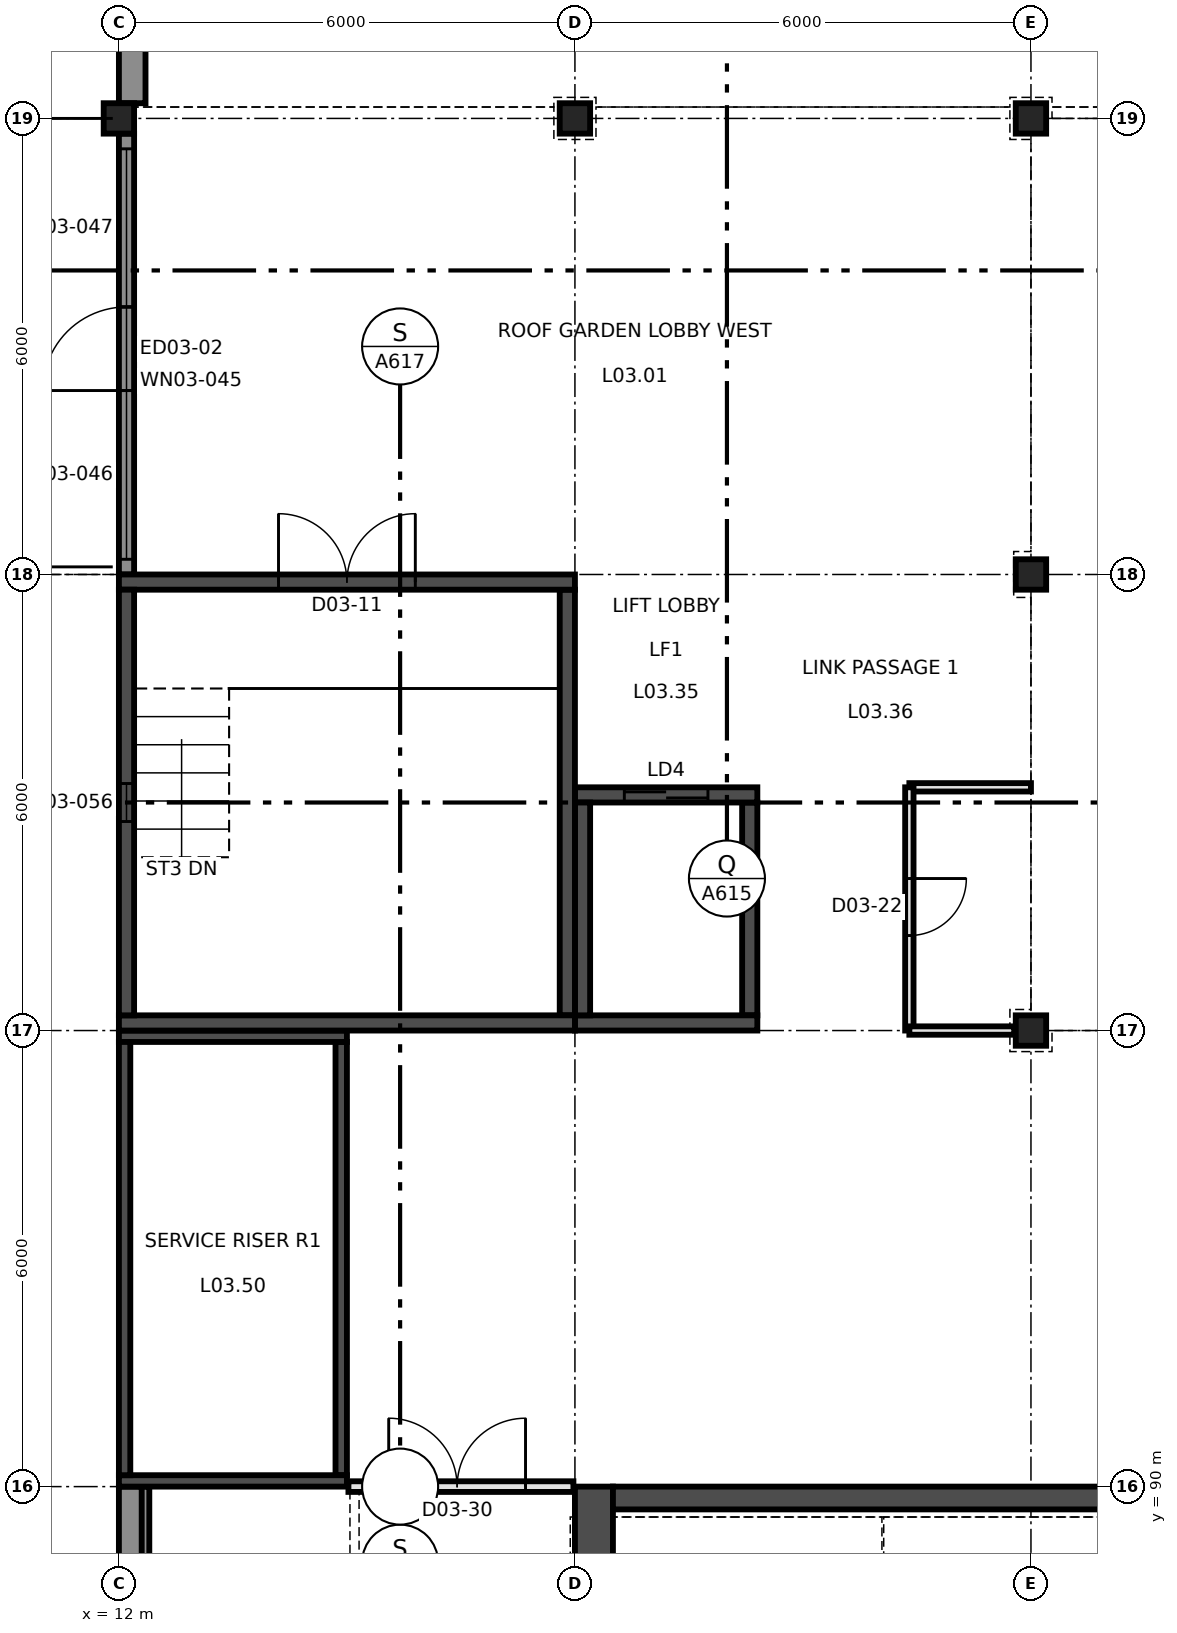
"""IFC4 building model, lengths in metres.
Left out: names, types, materials, properties, quantities, classifications, styles, units other than length and angle.
Written with IfcOpenShell. Run it as: python <this file> out.ifc"""

import sys

from ifc_helpers import new_model, si_unit, direction, frame, frame_2d, origin, origin_2d, place, context, subcontext, project, spatial, rectangle, extrude, element, fill, save


model = new_model("IFC4")
c1 = context("Model", 3, precision=1e-05, world=origin(), true_north=direction((0.0, 1.0)))
c2 = subcontext(c1, "Body", "Model", "MODEL_VIEW")
j1 = project(units=[si_unit("LENGTHUNIT", "METRE"), si_unit("PLANEANGLEUNIT", "RADIAN")], contexts=[c1])
p1 = place(None, origin())
s1 = spatial("IfcSite", under=j1, at=p1, CompositionType="ELEMENT")
p2 = place(p1, origin())
s2 = spatial("IfcBuilding", under=s1, at=p2, CompositionType="ELEMENT")
p3 = place(p2, frame((0.0, 0.0, 16.5)))
s3 = spatial("IfcBuildingStorey", under=s2, at=p3, CompositionType="ELEMENT", Elevation=16.5)
for number, where, z_axis, x_axis in (
    (1, (24.0, 96.0, 0.0), (0.0, 0.0, 1.0), (1.0, 0.0, 0.0)),
    (2, (24.0, 102.0, 0.0), (0.0, 0.0, 1.0), (1.0, 0.0, 0.0)),
    (3, (12.0, 108.0, 0.0), (0.0, 0.0, 1.0), (1.0, 0.0, 0.0)),
    (4, (18.0, 108.0, 0.0), (0.0, 0.0, 1.0), (1.0, 0.0, 0.0)),
    (5, (24.0, 108.0, 0.0), (0.0, 0.0, 1.0), (1.0, 0.0, 0.0)),
):
    element("IfcColumn", number, at=place(p3, frame(where, z_axis=z_axis, x_axis=x_axis)), inside=s3, PredefinedType="COLUMN", context=c2, shape_type="SweptSolid", body=[
        extrude(rectangle(XDim=0.4, YDim=0.4, at=origin_2d()), origin(), (0.0, 0.0, 1.0), 11.5),
    ])
p4 = place(p3, frame((12.0, 101.9, 0.0), z_axis=(0.0, 0.0, 1.0), x_axis=(1.0, 0.0, 0.0)))
e6 = element("IfcWall", 6, at=p4, inside=s3, PredefinedType="SHEAR", context=c2, shape_type="SweptSolid", body=[
    extrude(rectangle(XDim=6.0, YDim=0.2, at=frame_2d((3.0, 0.0))), origin(), (0.0, 0.0, 1.0), 11.5),
])
p5 = place(p4, frame((2.1, 0.0, 0.0)))
e7 = element("IfcOpeningElement", 7, at=p5, cuts=e6, PredefinedType="OPENING", context=c2, shape_type="SweptSolid", body=[
    extrude(rectangle(XDim=1.8, YDim=2.2, at=frame_2d((0.9, 1.1))), frame((0.0, 0.11, 0.0), z_axis=(0.0, -1.0, 0.0), x_axis=(1.0, 0.0, 0.0)), (0.0, 0.0, 1.0), 0.22),
])
p6 = place(p3, frame((12.0, 96.1, 0.0), z_axis=(0.0, 0.0, 1.0), x_axis=(1.0, 0.0, 0.0)))
e8 = element("IfcWall", 8, at=p6, inside=s3, PredefinedType="SHEAR", context=c2, shape_type="SweptSolid", body=[
    extrude(rectangle(XDim=6.0, YDim=0.2, at=frame_2d((3.0, 0.0))), origin(), (0.0, 0.0, 1.0), 11.5),
])
p7 = place(p3, frame((12.1, 96.2, 0.0), z_axis=(0.0, 0.0, 1.0), x_axis=(0.0, 1.0, 0.0)))
e9 = element("IfcWall", 9, at=p7, inside=s3, PredefinedType="SHEAR", context=c2, shape_type="SweptSolid", body=[
    extrude(rectangle(XDim=5.6, YDim=0.2, at=frame_2d((2.8, 0.0))), origin(), (0.0, 0.0, 1.0), 11.5),
])
p8 = place(p7, frame((2.55, 0.0, 0.9)))
e10 = element("IfcOpeningElement", 10, at=p8, cuts=e9, PredefinedType="OPENING", context=c2, shape_type="SweptSolid", body=[
    extrude(rectangle(XDim=0.5, YDim=2.1, at=frame_2d((0.25, 1.05))), frame((0.0, 0.11, 0.0), z_axis=(0.0, -1.0, 0.0), x_axis=(1.0, 0.0, 0.0)), (0.0, 0.0, 1.0), 0.22),
])
p9 = place(p3, frame((17.9, 96.2, 0.0), z_axis=(0.0, 0.0, 1.0), x_axis=(0.0, 1.0, 0.0)))
e11 = element("IfcWall", 11, at=p9, inside=s3, PredefinedType="SHEAR", context=c2, shape_type="SweptSolid", body=[
    extrude(rectangle(XDim=5.6, YDim=0.2, at=frame_2d((2.8, 0.0))), origin(), (0.0, 0.0, 1.0), 11.5),
])
p10 = place(p3, frame((18.0, 99.1, 0.0), z_axis=(0.0, 0.0, 1.0), x_axis=(1.0, 0.0, 0.0)))
e12 = element("IfcWall", 12, at=p10, inside=s3, PredefinedType="SHEAR", context=c2, shape_type="SweptSolid", body=[
    extrude(rectangle(XDim=2.4, YDim=0.2, at=frame_2d((1.2, 0.0))), origin(), (0.0, 0.0, 1.0), 11.5),
])
p11 = place(p10, frame((0.65, 0.0, 0.0)))
e13 = element("IfcOpeningElement", 13, at=p11, cuts=e12, PredefinedType="OPENING", context=c2, shape_type="SweptSolid", body=[
    extrude(rectangle(XDim=1.1, YDim=2.1, at=frame_2d((0.55, 1.05))), frame((0.0, 0.11, 0.0), z_axis=(0.0, -1.0, 0.0), x_axis=(1.0, 0.0, 0.0)), (0.0, 0.0, 1.0), 0.22),
])
p12 = place(p3, frame((18.0, 96.1, 0.0), z_axis=(0.0, 0.0, 1.0), x_axis=(1.0, 0.0, 0.0)))
e14 = element("IfcWall", 14, at=p12, inside=s3, PredefinedType="SHEAR", context=c2, shape_type="SweptSolid", body=[
    extrude(rectangle(XDim=2.4, YDim=0.2, at=frame_2d((1.2, 0.0))), origin(), (0.0, 0.0, 1.0), 11.5),
])
for number, where, z_axis, x_axis in (
    (15, (18.1, 96.2, 0.0), (0.0, 0.0, 1.0), (0.0, 1.0, 0.0)),
    (16, (20.3, 96.2, 0.0), (0.0, 0.0, 1.0), (0.0, 1.0, 0.0)),
):
    element("IfcWall", number, at=place(p3, frame(where, z_axis=z_axis, x_axis=x_axis)), inside=s3, PredefinedType="SHEAR", context=c2, shape_type="SweptSolid", body=[
        extrude(rectangle(XDim=2.8, YDim=0.2, at=frame_2d((1.4, 0.0))), origin(), (0.0, 0.0, 1.0), 11.5),
    ])
for number, where, z_axis, x_axis in (
    (17, (12.0, 95.925, 0.0), (0.0, 0.0, 1.0), (1.0, 0.0, 0.0)),
    (18, (12.0, 90.075, 0.0), (0.0, 0.0, 1.0), (1.0, 0.0, 0.0)),
):
    element("IfcWall", number, at=place(p3, frame(where, z_axis=z_axis, x_axis=x_axis)), inside=s3, PredefinedType="SHEAR", context=c2, shape_type="SweptSolid", body=[
        extrude(rectangle(XDim=3.0, YDim=0.15, at=frame_2d((1.5, 0.0))), origin(), (0.0, 0.0, 1.0), 11.5),
    ])
for number, where, z_axis, x_axis in (
    (19, (12.075, 90.15, 0.0), (0.0, 0.0, 1.0), (0.0, 1.0, 0.0)),
    (20, (14.925, 90.15, 0.0), (0.0, 0.0, 1.0), (0.0, 1.0, 0.0)),
):
    element("IfcWall", number, at=place(p3, frame(where, z_axis=z_axis, x_axis=x_axis)), inside=s3, PredefinedType="SHEAR", context=c2, shape_type="SweptSolid", body=[
        extrude(rectangle(XDim=5.7, YDim=0.15, at=frame_2d((2.85, 0.0))), origin(), (0.0, 0.0, 1.0), 11.5),
    ])
p13 = place(p3, frame((18.25, 54.5, 0.0), z_axis=(0.0, 0.0, 1.0), x_axis=(0.0, 1.0, 0.0)))
e21 = element("IfcWall", 21, at=p13, inside=s3, PredefinedType="SHEAR", context=c2, shape_type="SweptSolid", body=[
    extrude(rectangle(XDim=35.5, YDim=0.5, at=frame_2d((17.75, 0.0))), origin(), (0.0, 0.0, 1.0), 3.9),
])
p14 = place(p13, frame((29.35, 0.0, 0.0)))
e22 = element("IfcOpeningElement", 22, at=p14, cuts=e21, PredefinedType="OPENING", context=c2, shape_type="SweptSolid", body=[
    extrude(rectangle(XDim=1.3, YDim=2.1, at=frame_2d((0.65, 1.05))), frame((0.0, 0.26, 0.0), z_axis=(0.0, -1.0, 0.0), x_axis=(1.0, 0.0, 0.0)), (0.0, 0.0, 1.0), 0.52),
])
p15 = place(p13, frame((2.6, 0.0, 0.0)))
e23 = element("IfcOpeningElement", 23, at=p15, cuts=e21, PredefinedType="OPENING", context=c2, shape_type="SweptSolid", body=[
    extrude(rectangle(XDim=1.0, YDim=2.1, at=frame_2d((0.5, 1.05))), frame((0.0, 0.26, 0.0), z_axis=(0.0, -1.0, 0.0), x_axis=(1.0, 0.0, 0.0)), (0.0, 0.0, 1.0), 0.52),
])
p16 = place(p3, frame((18.5, 89.85, 0.0), z_axis=(0.0, 0.0, 1.0), x_axis=(1.0, 0.0, 0.0)))
e24 = element("IfcWall", 24, at=p16, inside=s3, PredefinedType="SHEAR", context=c2, shape_type="SweptSolid", body=[
    extrude(rectangle(XDim=29.0, YDim=0.3, at=frame_2d((14.5, 0.0))), origin(), (0.0, 0.0, 1.0), 11.5),
])
p17 = place(p3, frame((12.225, 84.0, 0.0), z_axis=(0.0, 0.0, 1.0), x_axis=(0.0, 1.0, 0.0)))
e25 = element("IfcWall", 25, at=p17, inside=s3, PredefinedType="SOLIDWALL", context=c2, shape_type="SweptSolid", body=[
    extrude(rectangle(XDim=6.0, YDim=0.35, at=frame_2d((3.0, 0.0))), origin(), (0.0, 0.0, 1.0), 3.9),
])
p18 = place(p3, frame((12.1, 102.0, 0.0), z_axis=(0.0, 0.0, 1.0), x_axis=(0.0, 1.0, 0.0)))
e26 = element("IfcWall", 26, at=p18, inside=s3, PredefinedType="SOLIDWALL", context=c2, shape_type="SweptSolid", body=[
    extrude(rectangle(XDim=5.8, YDim=0.2, at=frame_2d((2.9, 0.0))), origin(), (0.0, 0.0, 1.0), 10.9),
])
p19 = place(p18, frame((2.42, 0.0, 0.0)))
e27 = element("IfcOpeningElement", 27, at=p19, cuts=e26, PredefinedType="OPENING", context=c2, shape_type="SweptSolid", body=[
    extrude(rectangle(XDim=1.1, YDim=2.4, at=frame_2d((0.55, 1.2))), frame((0.0, 0.11, 0.0), z_axis=(0.0, -1.0, 0.0), x_axis=(1.0, 0.0, 0.0)), (0.0, 0.0, 1.0), 0.22),
])
p20 = place(p18, frame((2.42, 0.0, 2.5)))
e28 = element("IfcOpeningElement", 28, at=p20, cuts=e26, PredefinedType="OPENING", context=c2, shape_type="SweptSolid", body=[
    extrude(rectangle(XDim=1.1, YDim=2.9, at=frame_2d((0.55, 1.45))), frame((0.0, 0.11, 0.0), z_axis=(0.0, -1.0, 0.0), x_axis=(1.0, 0.0, 0.0)), (0.0, 0.0, 1.0), 0.22),
])
p21 = place(p18, frame((0.2, 0.0, 0.1)))
e29 = element("IfcOpeningElement", 29, at=p21, cuts=e26, PredefinedType="OPENING", context=c2, shape_type="SweptSolid", body=[
    extrude(rectangle(XDim=2.22, YDim=5.3, at=frame_2d((1.11, 2.65))), frame((0.0, 0.11, 0.0), z_axis=(0.0, -1.0, 0.0), x_axis=(1.0, 0.0, 0.0)), (0.0, 0.0, 1.0), 0.22),
])
p22 = place(p18, frame((3.52, 0.0, 0.1)))
e30 = element("IfcOpeningElement", 30, at=p22, cuts=e26, PredefinedType="OPENING", context=c2, shape_type="SweptSolid", body=[
    extrude(rectangle(XDim=2.08, YDim=5.3, at=frame_2d((1.04, 2.65))), frame((0.0, 0.11, 0.0), z_axis=(0.0, -1.0, 0.0), x_axis=(1.0, 0.0, 0.0)), (0.0, 0.0, 1.0), 0.22),
])
p23 = place(p3, frame((12.175, 108.2, 0.0), z_axis=(0.0, 0.0, 1.0), x_axis=(0.0, 1.0, 0.0)))
e31 = element("IfcWall", 31, at=p23, inside=s3, PredefinedType="SOLIDWALL", context=c2, shape_type="SweptSolid", body=[
    extrude(rectangle(XDim=5.6, YDim=0.35, at=frame_2d((2.8, 0.0))), origin(), (0.0, 0.0, 1.0), 10.9),
])
p24 = place(p23, frame((1.25, 0.0, 1.0)))
e32 = element("IfcOpeningElement", 32, at=p24, cuts=e31, PredefinedType="OPENING", context=c2, shape_type="SweptSolid", body=[
    extrude(rectangle(XDim=1.1, YDim=4.4, at=frame_2d((0.55, 2.2))), frame((0.0, 0.185, 0.0), z_axis=(0.0, -1.0, 0.0), x_axis=(1.0, 0.0, 0.0)), (0.0, 0.0, 1.0), 0.37),
])
p25 = place(p23, frame((3.25, 0.0, 1.0)))
e33 = element("IfcOpeningElement", 33, at=p25, cuts=e31, PredefinedType="OPENING", context=c2, shape_type="SweptSolid", body=[
    extrude(rectangle(XDim=1.1, YDim=4.4, at=frame_2d((0.55, 2.2))), frame((0.0, 0.185, 0.0), z_axis=(0.0, -1.0, 0.0), x_axis=(1.0, 0.0, 0.0)), (0.0, 0.0, 1.0), 0.37),
])
p26 = place(p23, frame((1.25, 0.0, 6.6)))
e34 = element("IfcOpeningElement", 34, at=p26, cuts=e31, PredefinedType="OPENING", context=c2, shape_type="SweptSolid", body=[
    extrude(rectangle(XDim=1.1, YDim=2.1, at=frame_2d((0.55, 1.05))), frame((0.0, 0.185, 0.0), z_axis=(0.0, -1.0, 0.0), x_axis=(1.0, 0.0, 0.0)), (0.0, 0.0, 1.0), 0.37),
])
p27 = place(p23, frame((3.25, 0.0, 6.6)))
e35 = element("IfcOpeningElement", 35, at=p27, cuts=e31, PredefinedType="OPENING", context=c2, shape_type="SweptSolid", body=[
    extrude(rectangle(XDim=1.1, YDim=2.1, at=frame_2d((0.55, 1.05))), frame((0.0, 0.185, 0.0), z_axis=(0.0, -1.0, 0.0), x_axis=(1.0, 0.0, 0.0)), (0.0, 0.0, 1.0), 0.37),
])
p28 = place(p3, frame((12.15, 30.0, 4.5), z_axis=(0.0, 0.0, 1.0), x_axis=(0.0, 1.0, 0.0)))
e36 = element("IfcWall", 36, at=p28, inside=s3, PredefinedType="PARAPET", context=c2, shape_type="SweptSolid", body=[
    extrude(rectangle(XDim=60.0, YDim=0.3, at=frame_2d((30.0, 0.0))), origin(), (0.0, 0.0, 1.0), 1.2),
])
p29 = place(p3, frame((22.4, 99.2, 0.0), z_axis=(0.0, 0.0, 1.0), x_axis=(1.0, 0.0, 0.0)))
e37 = element("IfcWall", 37, at=p29, inside=s3, PredefinedType="PARTITIONING", context=c2, shape_type="SweptSolid", body=[
    extrude(rectangle(XDim=1.6, YDim=0.11, at=frame_2d((0.8, 0.0))), origin(), (0.0, 0.0, 1.0), 6.28),
])
p30 = place(p3, frame((22.4, 96.0, 0.0), z_axis=(0.0, 0.0, 1.0), x_axis=(0.0, 1.0, 0.0)))
e38 = element("IfcWall", 38, at=p30, inside=s3, PredefinedType="PARTITIONING", context=c2, shape_type="SweptSolid", body=[
    extrude(rectangle(XDim=3.2, YDim=0.11, at=frame_2d((1.6, 0.0))), origin(), (0.0, 0.0, 1.0), 6.28),
])
p31 = place(p30, frame((1.25, 0.0, 0.0)))
e39 = element("IfcOpeningElement", 39, at=p31, cuts=e38, PredefinedType="OPENING", context=c2, shape_type="SweptSolid", body=[
    extrude(rectangle(XDim=0.75, YDim=2.04, at=frame_2d((0.375, 1.02))), frame((0.0, 0.065, 0.0), z_axis=(0.0, -1.0, 0.0), x_axis=(1.0, 0.0, 0.0)), (0.0, 0.0, 1.0), 0.13),
])
p32 = place(p3, frame((22.4, 96.0, 0.0), z_axis=(0.0, 0.0, 1.0), x_axis=(1.0, 0.0, 0.0)))
e40 = element("IfcWall", 40, at=p32, inside=s3, PredefinedType="PARTITIONING", context=c2, shape_type="SweptSolid", body=[
    extrude(rectangle(XDim=1.38, YDim=0.11, at=frame_2d((0.69, 0.0))), origin(), (0.0, 0.0, 1.0), 6.28),
])
p33 = place(p3, frame((15.02, 90.0, 0.0), z_axis=(0.0, 0.0, 1.0), x_axis=(1.0, 0.0, 0.0)))
e41 = element("IfcWall", 41, at=p33, inside=s3, PredefinedType="PARTITIONING", context=c2, shape_type="SweptSolid", body=[
    extrude(rectangle(XDim=2.96, YDim=0.14, at=frame_2d((1.48, 0.0))), origin(), (0.0, 0.0, 1.0), 3.9),
])
p34 = place(p33, frame((0.53, 0.0, 0.0)))
e42 = element("IfcOpeningElement", 42, at=p34, cuts=e41, PredefinedType="OPENING", context=c2, shape_type="SweptSolid", body=[
    extrude(rectangle(XDim=1.8, YDim=2.1, at=frame_2d((0.9, 1.05))), frame((0.0, 0.08, 0.0), z_axis=(0.0, -1.0, 0.0), x_axis=(1.0, 0.0, 0.0)), (0.0, 0.0, 1.0), 0.16),
])
p35 = place(p19, origin())
e43 = element("IfcDoor", 43, at=p35, inside=s3, OperationType="SINGLE_SWING_LEFT", PredefinedType="DOOR", context=c2, shape_type="SweptSolid", body=[
    extrude(rectangle(XDim=1.1, YDim=2.4, at=frame_2d((0.55, 1.2))), frame((0.0, 0.025, 0.0), z_axis=(0.0, -1.0, 0.0), x_axis=(1.0, 0.0, 0.0)), (0.0, 0.0, 1.0), 0.05),
])
fill(e27, e43)
p36 = place(p20, origin())
e44 = element("IfcWindow", 44, at=p36, inside=s3, PartitioningType="SINGLE_PANEL", PredefinedType="WINDOW", context=c2, shape_type="SweptSolid", body=[
    extrude(rectangle(XDim=1.1, YDim=2.9, at=frame_2d((0.55, 1.45))), frame((0.0, 0.03, 0.0), z_axis=(0.0, -1.0, 0.0), x_axis=(1.0, 0.0, 0.0)), (0.0, 0.0, 1.0), 0.06),
])
fill(e28, e44)
p37 = place(p21, origin())
e45 = element("IfcWindow", 45, at=p37, inside=s3, PartitioningType="SINGLE_PANEL", PredefinedType="WINDOW", context=c2, shape_type="SweptSolid", body=[
    extrude(rectangle(XDim=2.22, YDim=5.3, at=frame_2d((1.11, 2.65))), frame((0.0, 0.03, 0.0), z_axis=(0.0, -1.0, 0.0), x_axis=(1.0, 0.0, 0.0)), (0.0, 0.0, 1.0), 0.06),
])
fill(e29, e45)
p38 = place(p22, origin())
e46 = element("IfcWindow", 46, at=p38, inside=s3, PartitioningType="SINGLE_PANEL", PredefinedType="WINDOW", context=c2, shape_type="SweptSolid", body=[
    extrude(rectangle(XDim=2.08, YDim=5.3, at=frame_2d((1.04, 2.65))), frame((0.0, 0.03, 0.0), z_axis=(0.0, -1.0, 0.0), x_axis=(1.0, 0.0, 0.0)), (0.0, 0.0, 1.0), 0.06),
])
fill(e30, e46)
p39 = place(p8, origin())
e47 = element("IfcWindow", 47, at=p39, inside=s3, PartitioningType="SINGLE_PANEL", PredefinedType="WINDOW", context=c2, shape_type="SweptSolid", body=[
    extrude(rectangle(XDim=0.5, YDim=2.1, at=frame_2d((0.25, 1.05))), frame((0.0, 0.03, 0.0), z_axis=(0.0, -1.0, 0.0), x_axis=(1.0, 0.0, 0.0)), (0.0, 0.0, 1.0), 0.06),
])
fill(e10, e47)
p40 = place(p5, frame((1.8, 0.0, 0.0), z_axis=(0.0, 0.0, 1.0), x_axis=(-1.0, 0.0, 0.0)))
e48 = element("IfcDoor", 48, at=p40, inside=s3, OperationType="DOUBLE_DOOR_SINGLE_SWING", PredefinedType="DOOR", context=c2, shape_type="SweptSolid", body=[
    extrude(rectangle(XDim=1.8, YDim=2.2, at=frame_2d((0.9, 1.1))), frame((0.0, 0.025, 0.0), z_axis=(0.0, -1.0, 0.0), x_axis=(1.0, 0.0, 0.0)), (0.0, 0.0, 1.0), 0.05),
])
fill(e7, e48)
p41 = place(p31, frame((0.75, 0.0, 0.0), z_axis=(0.0, 0.0, 1.0), x_axis=(-1.0, 0.0, 0.0)))
e49 = element("IfcDoor", 49, at=p41, inside=s3, OperationType="SINGLE_SWING_RIGHT", PredefinedType="DOOR", context=c2, shape_type="SweptSolid", body=[
    extrude(rectangle(XDim=0.75, YDim=2.04, at=frame_2d((0.375, 1.02))), frame((0.0, 0.025, 0.0), z_axis=(0.0, -1.0, 0.0), x_axis=(1.0, 0.0, 0.0)), (0.0, 0.0, 1.0), 0.05),
])
fill(e39, e49)
p42 = place(p34, frame((1.8, 0.0, 0.0), z_axis=(0.0, 0.0, 1.0), x_axis=(-1.0, 0.0, 0.0)))
e50 = element("IfcDoor", 50, at=p42, inside=s3, OperationType="DOUBLE_DOOR_SINGLE_SWING", PredefinedType="DOOR", context=c2, shape_type="SweptSolid", body=[
    extrude(rectangle(XDim=1.8, YDim=2.1, at=frame_2d((0.9, 1.05))), frame((0.0, 0.025, 0.0), z_axis=(0.0, -1.0, 0.0), x_axis=(1.0, 0.0, 0.0)), (0.0, 0.0, 1.0), 0.05),
])
fill(e42, e50)
p43 = place(p11, origin())
e51 = element("IfcDoor", 51, at=p43, inside=s3, OperationType="DOUBLE_DOOR_SLIDING", PredefinedType="DOOR", context=c2, shape_type="SweptSolid", body=[
    extrude(rectangle(XDim=1.1, YDim=2.1, at=frame_2d((0.55, 1.05))), frame((0.0, 0.025, 0.0), z_axis=(0.0, -1.0, 0.0), x_axis=(1.0, 0.0, 0.0)), (0.0, 0.0, 1.0), 0.05),
])
fill(e13, e51)
save(model, sys.argv[1])
